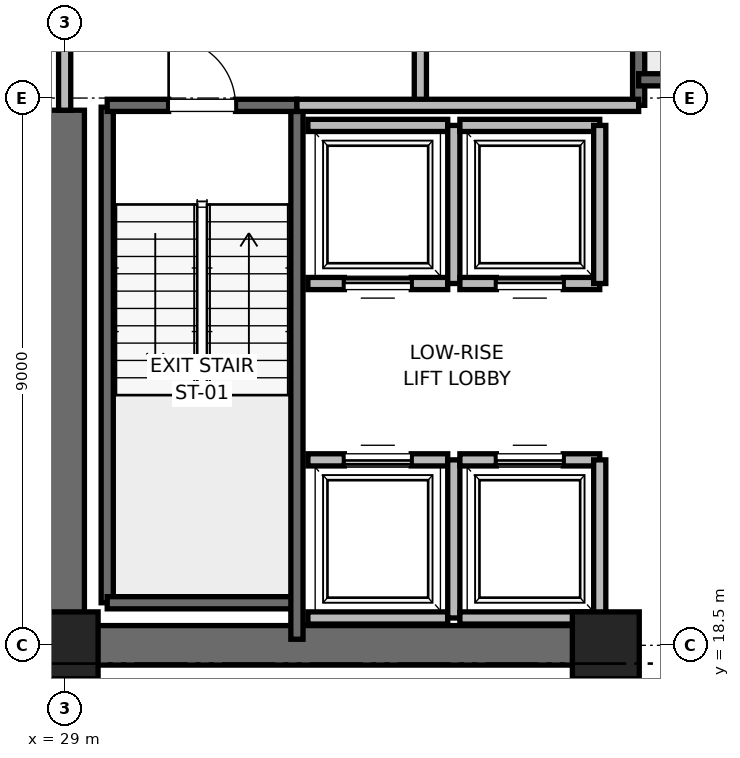
"""IFC4 building model, lengths in metres.
Left out: names, types, materials, properties, quantities, classifications, styles, units other than length and angle.
Written with IfcOpenShell. Run it as: python <this file> out.ifc"""

import sys

from ifc_helpers import new_model, si_unit, direction, frame, frame_2d, origin, origin_2d, place, context, subcontext, project, spatial, rectangle, extrude, element, fill, save


model = new_model("IFC4")
c1 = context("Model", 3, precision=1e-05, world=origin(), true_north=direction((0.0, 1.0)))
c2 = subcontext(c1, "Body", "Model", "MODEL_VIEW")
j1 = project(units=[si_unit("LENGTHUNIT", "METRE"), si_unit("PLANEANGLEUNIT", "RADIAN")], contexts=[c1])
p1 = place(None, origin())
s1 = spatial("IfcSite", under=j1, at=p1, CompositionType="ELEMENT")
p2 = place(p1, origin())
s2 = spatial("IfcBuilding", under=s1, at=p2, CompositionType="ELEMENT")
p3 = place(p2, frame((0.0, 0.0, 75.6)))
s3 = spatial("IfcBuildingStorey", under=s2, at=p3, CompositionType="ELEMENT", Elevation=75.6)
for number, where, z_axis, x_axis in (
    (1, (29.0, 18.5, 0.0), (0.0, 0.0, 1.0), (1.0, 0.0, 0.0)),
    (2, (37.9, 18.5, 0.0), (0.0, 0.0, 1.0), (1.0, 0.0, 0.0)),
):
    element("IfcColumn", number, at=place(p3, frame(where, z_axis=z_axis, x_axis=x_axis)), inside=s3, PredefinedType="PILASTER", context=c2, shape_type="SweptSolid", body=[
        extrude(rectangle(XDim=1.1, YDim=1.1, at=origin_2d()), origin(), (0.0, 0.0, 1.0), 4.0),
    ])
p4 = place(p3, frame((29.0, 18.5, 0.0), z_axis=(0.0, 0.0, 1.0), x_axis=(1.0, 0.0, 0.0)))
e3 = element("IfcWall", 3, at=p4, inside=s3, PredefinedType="SHEAR", context=c2, shape_type="SweptSolid", body=[
    extrude(rectangle(XDim=9.2, YDim=0.65, at=frame_2d((4.6, 0.0))), origin(), (0.0, 0.0, 1.0), 3.76),
])
p5 = place(p3, frame((29.0, 18.5, 0.0), z_axis=(0.0, 0.0, 1.0), x_axis=(0.0, 1.0, 0.0)))
e4 = element("IfcWall", 4, at=p5, inside=s3, PredefinedType="SHEAR", context=c2, shape_type="SweptSolid", body=[
    extrude(rectangle(XDim=8.8, YDim=0.65, at=frame_2d((4.4, 0.0))), origin(), (0.0, 0.0, 1.0), 3.76),
])
p6 = place(p3, frame((29.7, 19.2, 0.0), z_axis=(0.0, 0.0, 1.0), x_axis=(0.0, 1.0, 0.0)))
e5 = element("IfcWall", 5, at=p6, inside=s3, PredefinedType="SOLIDWALL", context=c2, shape_type="SweptSolid", body=[
    extrude(rectangle(XDim=8.15, YDim=0.2, at=frame_2d((4.075, 0.0))), origin(), (0.0, 0.0, 1.0), 3.76),
])
p7 = place(p3, frame((29.7, 19.2, 0.0), z_axis=(0.0, 0.0, 1.0), x_axis=(1.0, 0.0, 0.0)))
e6 = element("IfcWall", 6, at=p7, inside=s3, PredefinedType="SOLIDWALL", context=c2, shape_type="SweptSolid", body=[
    extrude(rectangle(XDim=3.12, YDim=0.2, at=frame_2d((1.56, 0.0))), origin(), (0.0, 0.0, 1.0), 3.76),
])
p8 = place(p3, frame((32.82, 18.6, 0.0), z_axis=(0.0, 0.0, 1.0), x_axis=(0.0, 1.0, 0.0)))
e7 = element("IfcWall", 7, at=p8, inside=s3, PredefinedType="SOLIDWALL", context=c2, shape_type="SweptSolid", body=[
    extrude(rectangle(XDim=8.78, YDim=0.2, at=frame_2d((4.39, 0.0))), origin(), (0.0, 0.0, 1.0), 3.76),
])
p9 = place(p3, frame((29.7, 27.38, 0.0), z_axis=(0.0, 0.0, 1.0), x_axis=(1.0, 0.0, 0.0)))
e8 = element("IfcWall", 8, at=p9, inside=s3, PredefinedType="SOLIDWALL", context=c2, shape_type="SweptSolid", body=[
    extrude(rectangle(XDim=3.12, YDim=0.2, at=frame_2d((1.56, 0.0))), origin(), (0.0, 0.0, 1.0), 3.76),
])
p10 = place(p9, frame((1.01, 0.0, 0.0)))
e9 = element("IfcOpeningElement", 9, at=p10, cuts=e8, PredefinedType="OPENING", context=c2, shape_type="SweptSolid", body=[
    extrude(rectangle(XDim=1.1, YDim=2.15, at=frame_2d((0.55, 1.075))), frame((0.0, 0.1, 0.0), z_axis=(0.0, -1.0, 0.0), x_axis=(1.0, 0.0, 0.0)), (0.0, 0.0, 1.0), 0.2),
])
p11 = place(p3, frame((38.44, 27.38, 0.0), z_axis=(0.0, 0.0, 1.0), x_axis=(0.0, 1.0, 0.0)))
e10 = element("IfcWall", 10, at=p11, inside=s3, PredefinedType="SOLIDWALL", context=c2, shape_type="SweptSolid", body=[
    extrude(rectangle(XDim=8.87, YDim=0.2, at=frame_2d((4.435, 0.0))), origin(), (0.0, 0.0, 1.0), 3.76),
])
p12 = place(p3, frame((38.44, 27.8, 0.0), z_axis=(0.0, 0.0, 1.0), x_axis=(1.0, 0.0, 0.0)))
e11 = element("IfcWall", 11, at=p12, inside=s3, PredefinedType="SOLIDWALL", context=c2, shape_type="SweptSolid", body=[
    extrude(rectangle(XDim=3.32, YDim=0.2, at=frame_2d((1.66, 0.0))), origin(), (0.0, 0.0, 1.0), 3.76),
])
p13 = place(p3, frame((34.85, 27.38, 0.0), z_axis=(0.0, 0.0, 1.0), x_axis=(0.0, 1.0, 0.0)))
e12 = element("IfcWall", 12, at=p13, inside=s3, PredefinedType="PARTITIONING", context=c2, shape_type="SweptSolid", body=[
    extrude(rectangle(XDim=3.37, YDim=0.2, at=frame_2d((1.685, 0.0))), origin(), (0.0, 0.0, 1.0), 3.76),
])
p14 = place(p13, frame((1.11, 0.0, 0.0)))
e13 = element("IfcOpeningElement", 13, at=p14, cuts=e12, PredefinedType="OPENING", context=c2, shape_type="SweptSolid", body=[
    extrude(rectangle(XDim=1.15, YDim=2.2, at=frame_2d((0.575, 1.1))), frame((0.0, 0.1, 0.0), z_axis=(0.0, -1.0, 0.0), x_axis=(1.0, 0.0, 0.0)), (0.0, 0.0, 1.0), 0.2),
])
p15 = place(p3, frame((29.0, 27.3, 0.0), z_axis=(0.0, 0.0, 1.0), x_axis=(0.0, 1.0, 0.0)))
e14 = element("IfcWall", 14, at=p15, inside=s3, PredefinedType="PARTITIONING", context=c2, shape_type="SweptSolid", body=[
    extrude(rectangle(XDim=3.4, YDim=0.2, at=frame_2d((1.7, 0.0))), origin(), (0.0, 0.0, 1.0), 2.54),
])
p16 = place(p15, frame((1.125, 0.0, 0.0)))
e15 = element("IfcOpeningElement", 15, at=p16, cuts=e14, PredefinedType="OPENING", context=c2, shape_type="SweptSolid", body=[
    extrude(rectangle(XDim=1.15, YDim=2.2, at=frame_2d((0.575, 1.1))), frame((0.0, 0.1, 0.0), z_axis=(0.0, -1.0, 0.0), x_axis=(1.0, 0.0, 0.0)), (0.0, 0.0, 1.0), 0.2),
])
p17 = place(p3, frame((32.82, 27.38, 0.0), z_axis=(0.0, 0.0, 1.0), x_axis=(1.0, 0.0, 0.0)))
e16 = element("IfcWall", 16, at=p17, inside=s3, PredefinedType="PARTITIONING", context=c2, shape_type="SweptSolid", body=[
    extrude(rectangle(XDim=5.62, YDim=0.2, at=frame_2d((2.81, 0.0))), origin(), (0.0, 0.0, 1.0), 3.76),
])
p18 = place(p3, frame((33.0, 18.95, 0.0), z_axis=(0.0, 0.0, 1.0), x_axis=(1.0, 0.0, 0.0)))
e17 = element("IfcWall", 17, at=p18, inside=s3, PredefinedType="SOLIDWALL", context=c2, shape_type="SweptSolid", body=[
    extrude(rectangle(XDim=2.3, YDim=0.2, at=frame_2d((1.15, 0.0))), origin(), (0.0, 0.0, 1.0), 3.76),
])
p19 = place(p3, frame((35.3, 21.55, 0.0), z_axis=(0.0, 0.0, 1.0), x_axis=(-1.0, 0.0, 0.0)))
e18 = element("IfcWall", 18, at=p19, inside=s3, PredefinedType="SOLIDWALL", context=c2, shape_type="SweptSolid", body=[
    extrude(rectangle(XDim=2.3, YDim=0.2, at=frame_2d((1.15, 0.0))), origin(), (0.0, 0.0, 1.0), 3.76),
])
p20 = place(p19, frame((0.6, 0.0, 0.0)))
e19 = element("IfcOpeningElement", 19, at=p20, cuts=e18, PredefinedType="OPENING", context=c2, shape_type="SweptSolid", body=[
    extrude(rectangle(XDim=1.1, YDim=2.2, at=frame_2d((0.55, 1.1))), frame((0.0, 0.1, 0.0), z_axis=(0.0, -1.0, 0.0), x_axis=(1.0, 0.0, 0.0)), (0.0, 0.0, 1.0), 0.2),
])
p21 = place(p3, frame((35.4, 18.95, 0.0), z_axis=(0.0, 0.0, 1.0), x_axis=(0.0, 1.0, 0.0)))
e20 = element("IfcWall", 20, at=p21, inside=s3, PredefinedType="SOLIDWALL", context=c2, shape_type="SweptSolid", body=[
    extrude(rectangle(XDim=2.6, YDim=0.2, at=frame_2d((1.3, 0.0))), origin(), (0.0, 0.0, 1.0), 3.76),
])
p22 = place(p3, frame((35.5, 18.95, 0.0), z_axis=(0.0, 0.0, 1.0), x_axis=(1.0, 0.0, 0.0)))
e21 = element("IfcWall", 21, at=p22, inside=s3, PredefinedType="SOLIDWALL", context=c2, shape_type="SweptSolid", body=[
    extrude(rectangle(XDim=2.3, YDim=0.2, at=frame_2d((1.15, 0.0))), origin(), (0.0, 0.0, 1.0), 2.54),
])
p23 = place(p3, frame((37.8, 21.55, 0.0), z_axis=(0.0, 0.0, 1.0), x_axis=(-1.0, 0.0, 0.0)))
e22 = element("IfcWall", 22, at=p23, inside=s3, PredefinedType="SOLIDWALL", context=c2, shape_type="SweptSolid", body=[
    extrude(rectangle(XDim=2.3, YDim=0.2, at=frame_2d((1.15, 0.0))), origin(), (0.0, 0.0, 1.0), 3.76),
])
p24 = place(p23, frame((0.6, 0.0, 0.0)))
e23 = element("IfcOpeningElement", 23, at=p24, cuts=e22, PredefinedType="OPENING", context=c2, shape_type="SweptSolid", body=[
    extrude(rectangle(XDim=1.1, YDim=2.2, at=frame_2d((0.55, 1.1))), frame((0.0, 0.1, 0.0), z_axis=(0.0, -1.0, 0.0), x_axis=(1.0, 0.0, 0.0)), (0.0, 0.0, 1.0), 0.2),
])
p25 = place(p3, frame((37.8, 18.95, 0.0), z_axis=(0.0, 0.0, 1.0), x_axis=(0.0, 1.0, 0.0)))
e24 = element("IfcWall", 24, at=p25, inside=s3, PredefinedType="SOLIDWALL", context=c2, shape_type="SweptSolid", body=[
    extrude(rectangle(XDim=2.6, YDim=0.2, at=frame_2d((1.3, 0.0))), origin(), (0.0, 0.0, 1.0), 2.54),
])
p26 = place(p3, frame((33.0, 24.45, 0.0), z_axis=(0.0, 0.0, 1.0), x_axis=(1.0, 0.0, 0.0)))
e25 = element("IfcWall", 25, at=p26, inside=s3, PredefinedType="SOLIDWALL", context=c2, shape_type="SweptSolid", body=[
    extrude(rectangle(XDim=2.3, YDim=0.2, at=frame_2d((1.15, 0.0))), origin(), (0.0, 0.0, 1.0), 3.76),
])
p27 = place(p26, frame((0.6, 0.0, 0.0)))
e26 = element("IfcOpeningElement", 26, at=p27, cuts=e25, PredefinedType="OPENING", context=c2, shape_type="SweptSolid", body=[
    extrude(rectangle(XDim=1.1, YDim=2.2, at=frame_2d((0.55, 1.1))), frame((0.0, 0.1, 0.0), z_axis=(0.0, -1.0, 0.0), x_axis=(1.0, 0.0, 0.0)), (0.0, 0.0, 1.0), 0.2),
])
p28 = place(p3, frame((35.3, 27.05, 0.0), z_axis=(0.0, 0.0, 1.0), x_axis=(-1.0, 0.0, 0.0)))
e27 = element("IfcWall", 27, at=p28, inside=s3, PredefinedType="SOLIDWALL", context=c2, shape_type="SweptSolid", body=[
    extrude(rectangle(XDim=2.3, YDim=0.2, at=frame_2d((1.15, 0.0))), origin(), (0.0, 0.0, 1.0), 3.76),
])
p29 = place(p3, frame((35.4, 24.45, 0.0), z_axis=(0.0, 0.0, 1.0), x_axis=(0.0, 1.0, 0.0)))
e28 = element("IfcWall", 28, at=p29, inside=s3, PredefinedType="SOLIDWALL", context=c2, shape_type="SweptSolid", body=[
    extrude(rectangle(XDim=2.6, YDim=0.2, at=frame_2d((1.3, 0.0))), origin(), (0.0, 0.0, 1.0), 3.76),
])
p30 = place(p3, frame((35.5, 24.45, 0.0), z_axis=(0.0, 0.0, 1.0), x_axis=(1.0, 0.0, 0.0)))
e29 = element("IfcWall", 29, at=p30, inside=s3, PredefinedType="SOLIDWALL", context=c2, shape_type="SweptSolid", body=[
    extrude(rectangle(XDim=2.3, YDim=0.2, at=frame_2d((1.15, 0.0))), origin(), (0.0, 0.0, 1.0), 3.76),
])
p31 = place(p30, frame((0.6, 0.0, 0.0)))
e30 = element("IfcOpeningElement", 30, at=p31, cuts=e29, PredefinedType="OPENING", context=c2, shape_type="SweptSolid", body=[
    extrude(rectangle(XDim=1.1, YDim=2.2, at=frame_2d((0.55, 1.1))), frame((0.0, 0.1, 0.0), z_axis=(0.0, -1.0, 0.0), x_axis=(1.0, 0.0, 0.0)), (0.0, 0.0, 1.0), 0.2),
])
p32 = place(p3, frame((37.8, 27.05, 0.0), z_axis=(0.0, 0.0, 1.0), x_axis=(-1.0, 0.0, 0.0)))
e31 = element("IfcWall", 31, at=p32, inside=s3, PredefinedType="SOLIDWALL", context=c2, shape_type="SweptSolid", body=[
    extrude(rectangle(XDim=2.3, YDim=0.2, at=frame_2d((1.15, 0.0))), origin(), (0.0, 0.0, 1.0), 3.76),
])
p33 = place(p3, frame((37.8, 24.45, 0.0), z_axis=(0.0, 0.0, 1.0), x_axis=(0.0, 1.0, 0.0)))
e32 = element("IfcWall", 32, at=p33, inside=s3, PredefinedType="SOLIDWALL", context=c2, shape_type="SweptSolid", body=[
    extrude(rectangle(XDim=2.6, YDim=0.2, at=frame_2d((1.3, 0.0))), origin(), (0.0, 0.0, 1.0), 3.76),
])
p34 = place(p10, origin())
e33 = element("IfcDoor", 33, at=p34, inside=s3, OperationType="SINGLE_SWING_LEFT", PredefinedType="DOOR", context=c2, shape_type="SweptSolid", body=[
    extrude(rectangle(XDim=1.1, YDim=2.15, at=frame_2d((0.55, 1.075))), frame((0.0, 0.025, 0.0), z_axis=(0.0, -1.0, 0.0), x_axis=(1.0, 0.0, 0.0)), (0.0, 0.0, 1.0), 0.05),
])
fill(e9, e33)
p35 = place(p20, origin())
e34 = element("IfcDoor", 34, at=p35, inside=s3, OperationType="SLIDING_TO_RIGHT", PredefinedType="DOOR", context=c2, shape_type="SweptSolid", body=[
    extrude(rectangle(XDim=1.1, YDim=2.2, at=frame_2d((0.55, 1.1))), frame((0.0, 0.025, 0.0), z_axis=(0.0, -1.0, 0.0), x_axis=(1.0, 0.0, 0.0)), (0.0, 0.0, 1.0), 0.05),
])
fill(e19, e34)
p36 = place(p24, origin())
e35 = element("IfcDoor", 35, at=p36, inside=s3, OperationType="SLIDING_TO_RIGHT", PredefinedType="DOOR", context=c2, shape_type="SweptSolid", body=[
    extrude(rectangle(XDim=1.1, YDim=2.2, at=frame_2d((0.55, 1.1))), frame((0.0, 0.025, 0.0), z_axis=(0.0, -1.0, 0.0), x_axis=(1.0, 0.0, 0.0)), (0.0, 0.0, 1.0), 0.05),
])
fill(e23, e35)
p37 = place(p27, origin())
e36 = element("IfcDoor", 36, at=p37, inside=s3, OperationType="SLIDING_TO_RIGHT", PredefinedType="DOOR", context=c2, shape_type="SweptSolid", body=[
    extrude(rectangle(XDim=1.1, YDim=2.2, at=frame_2d((0.55, 1.1))), frame((0.0, 0.025, 0.0), z_axis=(0.0, -1.0, 0.0), x_axis=(1.0, 0.0, 0.0)), (0.0, 0.0, 1.0), 0.05),
])
fill(e26, e36)
p38 = place(p31, origin())
e37 = element("IfcDoor", 37, at=p38, inside=s3, OperationType="SLIDING_TO_RIGHT", PredefinedType="DOOR", context=c2, shape_type="SweptSolid", body=[
    extrude(rectangle(XDim=1.1, YDim=2.2, at=frame_2d((0.55, 1.1))), frame((0.0, 0.025, 0.0), z_axis=(0.0, -1.0, 0.0), x_axis=(1.0, 0.0, 0.0)), (0.0, 0.0, 1.0), 0.05),
])
fill(e30, e37)
save(model, sys.argv[1])
